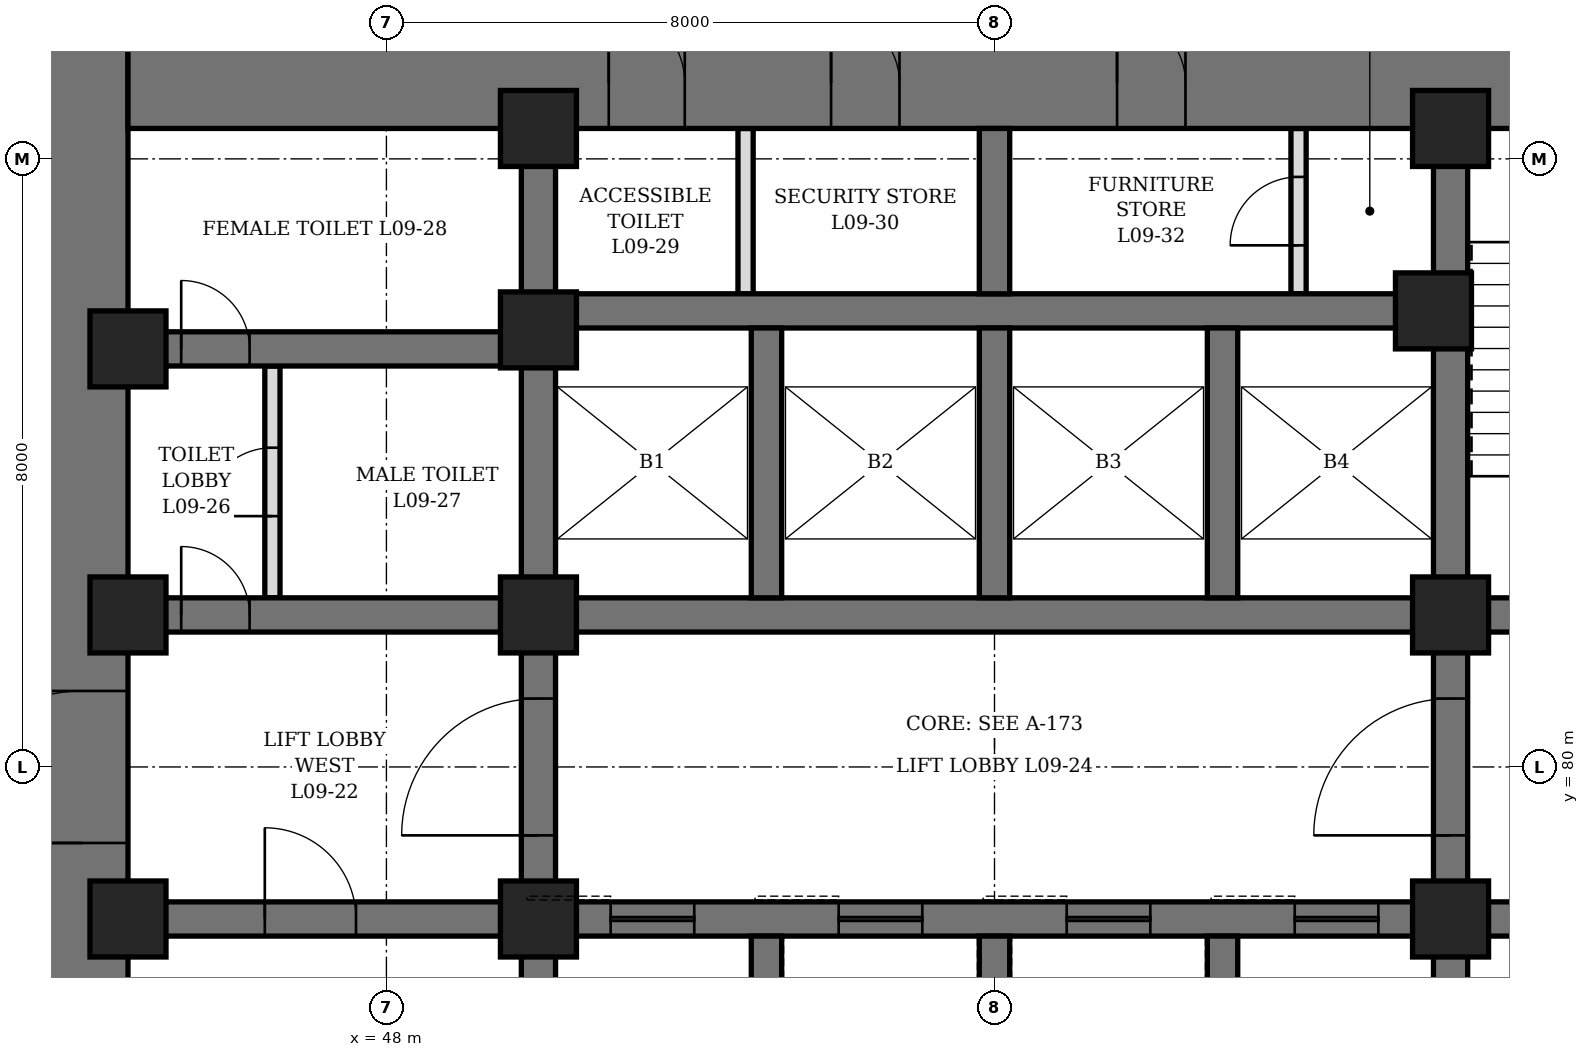
"""IFC4 building model, lengths in metres.
Left out: names, types, materials, properties, quantities, classifications, styles, units other than length and angle.
Written with IfcOpenShell. Run it as: python <this file> out.ifc"""

import sys

from ifc_helpers import new_model, si_unit, direction, frame, frame_2d, origin, origin_2d, place, context, subcontext, project, spatial, rectangle, hollow_rectangle, extrude, element, fill, save


model = new_model("IFC4")
c1 = context("Model", 3, precision=1e-05, world=origin(), true_north=direction((0.0, 1.0)))
c2 = subcontext(c1, "Body", "Model", "MODEL_VIEW")
j1 = project(units=[si_unit("LENGTHUNIT", "METRE"), si_unit("PLANEANGLEUNIT", "RADIAN")], contexts=[c1])
p1 = place(None, origin())
s1 = spatial("IfcSite", under=j1, at=p1, CompositionType="ELEMENT")
p2 = place(p1, origin())
s2 = spatial("IfcBuilding", under=s1, at=p2, CompositionType="ELEMENT")
p3 = place(p2, frame((0.0, 0.0, 47.5)))
s3 = spatial("IfcBuildingStorey", under=s2, at=p3, CompositionType="ELEMENT", Elevation=47.5)
p4 = place(p3, frame((44.0, 70.4, 0.0), z_axis=(0.0, 0.0, 1.0), x_axis=(0.0, 1.0, 0.0)))
e1 = element("IfcWall", 1, at=p4, inside=s3, PredefinedType="SHEAR", context=c2, shape_type="SweptSolid", body=[
    extrude(rectangle(XDim=19.2, YDim=1.2, at=frame_2d((9.6, 0.0))), origin(), (0.0, 0.0, 1.0), 4.2),
])
p5 = place(p4, frame((8.6, 0.0, 0.0)))
e2 = element("IfcOpeningElement", 2, at=p5, cuts=e1, PredefinedType="OPENING", context=c2, shape_type="SweptSolid", body=[
    extrude(rectangle(XDim=2.0, YDim=2.4, at=frame_2d((1.0, 1.2))), frame((0.0, 0.61, 0.0), z_axis=(0.0, -1.0, 0.0), x_axis=(1.0, 0.0, 0.0)), (0.0, 0.0, 1.0), 1.22),
])
p6 = place(p3, frame((44.6, 89.0, 0.0), z_axis=(0.0, 0.0, 1.0), x_axis=(1.0, 0.0, 0.0)))
e3 = element("IfcWall", 3, at=p6, inside=s3, PredefinedType="SHEAR", context=c2, shape_type="SweptSolid", body=[
    extrude(rectangle(XDim=22.8, YDim=1.2, at=frame_2d((11.4, 0.0))), origin(), (0.0, 0.0, 1.0), 4.2),
])
p7 = place(p6, frame((6.325, 0.0, 0.0)))
e4 = element("IfcOpeningElement", 4, at=p7, cuts=e3, PredefinedType="OPENING", context=c2, shape_type="SweptSolid", body=[
    extrude(rectangle(XDim=1.0, YDim=2.1, at=frame_2d((0.5, 1.05))), frame((0.0, 0.61, 0.0), z_axis=(0.0, -1.0, 0.0), x_axis=(1.0, 0.0, 0.0)), (0.0, 0.0, 1.0), 1.22),
])
p8 = place(p6, frame((9.25, 0.0, 0.0)))
e5 = element("IfcOpeningElement", 5, at=p8, cuts=e3, PredefinedType="OPENING", context=c2, shape_type="SweptSolid", body=[
    extrude(rectangle(XDim=0.9, YDim=2.1, at=frame_2d((0.45, 1.05))), frame((0.0, 0.61, 0.0), z_axis=(0.0, -1.0, 0.0), x_axis=(1.0, 0.0, 0.0)), (0.0, 0.0, 1.0), 1.22),
])
p9 = place(p6, frame((13.012, 0.0, 0.0)))
e6 = element("IfcOpeningElement", 6, at=p9, cuts=e3, PredefinedType="OPENING", context=c2, shape_type="SweptSolid", body=[
    extrude(rectangle(XDim=0.9, YDim=2.1, at=frame_2d((0.45, 1.05))), frame((0.0, 0.61, 0.0), z_axis=(0.0, -1.0, 0.0), x_axis=(1.0, 0.0, 0.0)), (0.0, 0.0, 1.0), 1.22),
])
p10 = place(p3, frame((50.0, 71.6, 0.0), z_axis=(0.0, 0.0, 1.0), x_axis=(0.0, 1.0, 0.0)))
e7 = element("IfcWall", 7, at=p10, inside=s3, PredefinedType="SHEAR", context=c2, shape_type="SweptSolid", body=[
    extrude(rectangle(XDim=16.8, YDim=0.45, at=frame_2d((8.4, 0.0))), origin(), (0.0, 0.0, 1.0), 4.2),
])
p11 = place(p10, frame((7.5, 0.0, 0.0)))
e8 = element("IfcOpeningElement", 8, at=p11, cuts=e7, PredefinedType="OPENING", context=c2, shape_type="SweptSolid", body=[
    extrude(rectangle(XDim=1.8, YDim=2.4, at=frame_2d((0.9, 1.2))), frame((0.0, 0.235, 0.0), z_axis=(0.0, -1.0, 0.0), x_axis=(1.0, 0.0, 0.0)), (0.0, 0.0, 1.0), 0.47),
])
p12 = place(p3, frame((62.0, 71.6, 0.0), z_axis=(0.0, 0.0, 1.0), x_axis=(0.0, 1.0, 0.0)))
e9 = element("IfcWall", 9, at=p12, inside=s3, PredefinedType="SHEAR", context=c2, shape_type="SweptSolid", body=[
    extrude(rectangle(XDim=16.8, YDim=0.45, at=frame_2d((8.4, 0.0))), origin(), (0.0, 0.0, 1.0), 4.2),
])
p13 = place(p12, frame((7.5, 0.0, 0.0)))
e10 = element("IfcOpeningElement", 10, at=p13, cuts=e9, PredefinedType="OPENING", context=c2, shape_type="SweptSolid", body=[
    extrude(rectangle(XDim=1.8, YDim=2.4, at=frame_2d((0.9, 1.2))), frame((0.0, 0.235, 0.0), z_axis=(0.0, -1.0, 0.0), x_axis=(1.0, 0.0, 0.0)), (0.0, 0.0, 1.0), 0.47),
])
p14 = place(p3, frame((44.6, 78.0, 0.0), z_axis=(0.0, 0.0, 1.0), x_axis=(1.0, 0.0, 0.0)))
e11 = element("IfcWall", 11, at=p14, inside=s3, PredefinedType="SHEAR", context=c2, shape_type="SweptSolid", body=[
    extrude(rectangle(XDim=5.175, YDim=0.45, at=frame_2d((2.587, 0.0))), origin(), (0.0, 0.0, 1.0), 4.2),
])
p15 = place(p14, frame((1.8, 0.0, 0.0)))
e12 = element("IfcOpeningElement", 12, at=p15, cuts=e11, PredefinedType="OPENING", context=c2, shape_type="SweptSolid", body=[
    extrude(rectangle(XDim=1.2, YDim=2.1, at=frame_2d((0.6, 1.05))), frame((0.0, 0.235, 0.0), z_axis=(0.0, -1.0, 0.0), x_axis=(1.0, 0.0, 0.0)), (0.0, 0.0, 1.0), 0.47),
])
p16 = place(p3, frame((44.6, 82.0, 0.0), z_axis=(0.0, 0.0, 1.0), x_axis=(1.0, 0.0, 0.0)))
e13 = element("IfcWall", 13, at=p16, inside=s3, PredefinedType="SHEAR", context=c2, shape_type="SweptSolid", body=[
    extrude(rectangle(XDim=5.175, YDim=0.45, at=frame_2d((2.587, 0.0))), origin(), (0.0, 0.0, 1.0), 4.2),
])
p17 = place(p16, frame((0.7, 0.0, 0.0)))
e14 = element("IfcOpeningElement", 14, at=p17, cuts=e13, PredefinedType="OPENING", context=c2, shape_type="SweptSolid", body=[
    extrude(rectangle(XDim=0.9, YDim=2.1, at=frame_2d((0.45, 1.05))), frame((0.0, 0.235, 0.0), z_axis=(0.0, -1.0, 0.0), x_axis=(1.0, 0.0, 0.0)), (0.0, 0.0, 1.0), 0.47),
])
p18 = place(p3, frame((44.6, 85.5, 0.0), z_axis=(0.0, 0.0, 1.0), x_axis=(1.0, 0.0, 0.0)))
e15 = element("IfcWall", 15, at=p18, inside=s3, PredefinedType="SHEAR", context=c2, shape_type="SweptSolid", body=[
    extrude(rectangle(XDim=5.175, YDim=0.45, at=frame_2d((2.587, 0.0))), origin(), (0.0, 0.0, 1.0), 4.2),
])
p19 = place(p18, frame((0.7, 0.0, 0.0)))
e16 = element("IfcOpeningElement", 16, at=p19, cuts=e15, PredefinedType="OPENING", context=c2, shape_type="SweptSolid", body=[
    extrude(rectangle(XDim=0.9, YDim=2.1, at=frame_2d((0.45, 1.05))), frame((0.0, 0.235, 0.0), z_axis=(0.0, -1.0, 0.0), x_axis=(1.0, 0.0, 0.0)), (0.0, 0.0, 1.0), 0.47),
])
p20 = place(p3, frame((62.225, 78.0, 0.0), z_axis=(0.0, 0.0, 1.0), x_axis=(1.0, 0.0, 0.0)))
e17 = element("IfcWall", 17, at=p20, inside=s3, PredefinedType="SHEAR", context=c2, shape_type="SweptSolid", body=[
    extrude(rectangle(XDim=5.175, YDim=0.45, at=frame_2d((2.587, 0.0))), origin(), (0.0, 0.0, 1.0), 4.2),
])
p21 = place(p20, frame((2.175, 0.0, 0.0)))
e18 = element("IfcOpeningElement", 18, at=p21, cuts=e17, PredefinedType="OPENING", context=c2, shape_type="SweptSolid", body=[
    extrude(rectangle(XDim=1.2, YDim=2.1, at=frame_2d((0.6, 1.05))), frame((0.0, 0.235, 0.0), z_axis=(0.0, -1.0, 0.0), x_axis=(1.0, 0.0, 0.0)), (0.0, 0.0, 1.0), 0.47),
])
p22 = place(p3, frame((62.225, 82.0, 0.0), z_axis=(0.0, 0.0, 1.0), x_axis=(1.0, 0.0, 0.0)))
e19 = element("IfcWall", 19, at=p22, inside=s3, PredefinedType="SHEAR", context=c2, shape_type="SweptSolid", body=[
    extrude(rectangle(XDim=5.175, YDim=0.45, at=frame_2d((2.587, 0.0))), origin(), (0.0, 0.0, 1.0), 4.2),
])
p23 = place(p22, frame((2.175, 0.0, 0.0)))
e20 = element("IfcOpeningElement", 20, at=p23, cuts=e19, PredefinedType="OPENING", context=c2, shape_type="SweptSolid", body=[
    extrude(rectangle(XDim=1.2, YDim=2.1, at=frame_2d((0.6, 1.05))), frame((0.0, 0.235, 0.0), z_axis=(0.0, -1.0, 0.0), x_axis=(1.0, 0.0, 0.0)), (0.0, 0.0, 1.0), 0.47),
])
p24 = place(p3, frame((50.225, 78.0, 0.0), z_axis=(0.0, 0.0, 1.0), x_axis=(1.0, 0.0, 0.0)))
e21 = element("IfcWall", 21, at=p24, inside=s3, PredefinedType="SHEAR", context=c2, shape_type="SweptSolid", body=[
    extrude(rectangle(XDim=11.55, YDim=0.45, at=frame_2d((5.775, 0.0))), origin(), (0.0, 0.0, 1.0), 4.2),
])
p25 = place(p24, frame((0.725, 0.0, 0.0)))
e22 = element("IfcOpeningElement", 22, at=p25, cuts=e21, PredefinedType="OPENING", context=c2, shape_type="SweptSolid", body=[
    extrude(rectangle(XDim=1.1, YDim=2.2, at=frame_2d((0.55, 1.1))), frame((0.0, 0.235, 0.0), z_axis=(0.0, -1.0, 0.0), x_axis=(1.0, 0.0, 0.0)), (0.0, 0.0, 1.0), 0.47),
])
p26 = place(p24, frame((3.725, 0.0, 0.0)))
e23 = element("IfcOpeningElement", 23, at=p26, cuts=e21, PredefinedType="OPENING", context=c2, shape_type="SweptSolid", body=[
    extrude(rectangle(XDim=1.1, YDim=2.2, at=frame_2d((0.55, 1.1))), frame((0.0, 0.235, 0.0), z_axis=(0.0, -1.0, 0.0), x_axis=(1.0, 0.0, 0.0)), (0.0, 0.0, 1.0), 0.47),
])
p27 = place(p24, frame((6.725, 0.0, 0.0)))
e24 = element("IfcOpeningElement", 24, at=p27, cuts=e21, PredefinedType="OPENING", context=c2, shape_type="SweptSolid", body=[
    extrude(rectangle(XDim=1.1, YDim=2.2, at=frame_2d((0.55, 1.1))), frame((0.0, 0.235, 0.0), z_axis=(0.0, -1.0, 0.0), x_axis=(1.0, 0.0, 0.0)), (0.0, 0.0, 1.0), 0.47),
])
p28 = place(p24, frame((9.725, 0.0, 0.0)))
e25 = element("IfcOpeningElement", 25, at=p28, cuts=e21, PredefinedType="OPENING", context=c2, shape_type="SweptSolid", body=[
    extrude(rectangle(XDim=1.1, YDim=2.2, at=frame_2d((0.55, 1.1))), frame((0.0, 0.235, 0.0), z_axis=(0.0, -1.0, 0.0), x_axis=(1.0, 0.0, 0.0)), (0.0, 0.0, 1.0), 0.47),
])
for number, where, z_axis, x_axis in (
    (26, (50.225, 82.0, 0.0), (0.0, 0.0, 1.0), (1.0, 0.0, 0.0)),
    (27, (50.225, 86.0, 0.0), (0.0, 0.0, 1.0), (1.0, 0.0, 0.0)),
):
    element("IfcWall", number, at=place(p3, frame(where, z_axis=z_axis, x_axis=x_axis)), inside=s3, PredefinedType="SHEAR", context=c2, shape_type="SweptSolid", body=[
        extrude(rectangle(XDim=11.55, YDim=0.45, at=frame_2d((5.775, 0.0))), origin(), (0.0, 0.0, 1.0), 4.2),
    ])
p29 = place(p3, frame((53.0, 74.2, 0.0), z_axis=(0.0, 0.0, 1.0), x_axis=(0.0, 1.0, 0.0)))
e28 = element("IfcWall", 28, at=p29, inside=s3, PredefinedType="SHEAR", context=c2, shape_type="SweptSolid", body=[
    extrude(rectangle(XDim=3.575, YDim=0.4, at=frame_2d((1.788, 0.0))), origin(), (0.0, 0.0, 1.0), 4.2),
])
p30 = place(p3, frame((53.0, 82.225, 0.0), z_axis=(0.0, 0.0, 1.0), x_axis=(0.0, 1.0, 0.0)))
e29 = element("IfcWall", 29, at=p30, inside=s3, PredefinedType="SHEAR", context=c2, shape_type="SweptSolid", body=[
    extrude(rectangle(XDim=3.55, YDim=0.4, at=frame_2d((1.775, 0.0))), origin(), (0.0, 0.0, 1.0), 4.2),
])
p31 = place(p3, frame((56.0, 74.2, 0.0), z_axis=(0.0, 0.0, 1.0), x_axis=(0.0, 1.0, 0.0)))
e30 = element("IfcWall", 30, at=p31, inside=s3, PredefinedType="SHEAR", context=c2, shape_type="SweptSolid", body=[
    extrude(rectangle(XDim=3.575, YDim=0.4, at=frame_2d((1.788, 0.0))), origin(), (0.0, 0.0, 1.0), 4.2),
])
p32 = place(p3, frame((56.0, 82.225, 0.0), z_axis=(0.0, 0.0, 1.0), x_axis=(0.0, 1.0, 0.0)))
e31 = element("IfcWall", 31, at=p32, inside=s3, PredefinedType="SHEAR", context=c2, shape_type="SweptSolid", body=[
    extrude(rectangle(XDim=3.55, YDim=0.4, at=frame_2d((1.775, 0.0))), origin(), (0.0, 0.0, 1.0), 4.2),
])
p33 = place(p3, frame((59.0, 74.2, 0.0), z_axis=(0.0, 0.0, 1.0), x_axis=(0.0, 1.0, 0.0)))
e32 = element("IfcWall", 32, at=p33, inside=s3, PredefinedType="SHEAR", context=c2, shape_type="SweptSolid", body=[
    extrude(rectangle(XDim=3.575, YDim=0.4, at=frame_2d((1.788, 0.0))), origin(), (0.0, 0.0, 1.0), 4.2),
])
p34 = place(p3, frame((59.0, 82.225, 0.0), z_axis=(0.0, 0.0, 1.0), x_axis=(0.0, 1.0, 0.0)))
e33 = element("IfcWall", 33, at=p34, inside=s3, PredefinedType="SHEAR", context=c2, shape_type="SweptSolid", body=[
    extrude(rectangle(XDim=3.55, YDim=0.4, at=frame_2d((1.775, 0.0))), origin(), (0.0, 0.0, 1.0), 4.2),
])
p35 = place(p3, frame((56.0, 86.225, 0.0), z_axis=(0.0, 0.0, 1.0), x_axis=(0.0, 1.0, 0.0)))
e34 = element("IfcWall", 34, at=p35, inside=s3, PredefinedType="SHEAR", context=c2, shape_type="SweptSolid", body=[
    extrude(rectangle(XDim=2.175, YDim=0.4, at=frame_2d((1.087, 0.0))), origin(), (0.0, 0.0, 1.0), 4.2),
])
for number, where, z_axis, x_axis in (
    (35, (44.6, 78.0, 0.0), (0.0, 0.0, 1.0), (1.0, 0.0, 0.0)),
    (36, (44.6, 82.0, 0.0), (0.0, 0.0, 1.0), (1.0, 0.0, 0.0)),
    (37, (44.6, 85.5, 0.0), (0.0, 0.0, 1.0), (1.0, 0.0, 0.0)),
    (38, (50.0, 78.0, 0.0), (0.0, 0.0, 1.0), (1.0, 0.0, 0.0)),
    (39, (50.0, 82.0, 0.0), (0.0, 0.0, 1.0), (1.0, 0.0, 0.0)),
    (40, (50.0, 85.75, 0.0), (0.0, 0.0, 1.0), (1.0, 0.0, 0.0)),
    (41, (50.0, 88.4, 0.0), (0.0, 0.0, 1.0), (1.0, 0.0, 0.0)),
    (42, (61.775, 86.0, 0.0), (0.0, 0.0, 1.0), (1.0, 0.0, 0.0)),
    (43, (62.0, 78.0, 0.0), (0.0, 0.0, 1.0), (1.0, 0.0, 0.0)),
    (44, (62.0, 82.0, 0.0), (0.0, 0.0, 1.0), (1.0, 0.0, 0.0)),
    (45, (62.0, 88.4, 0.0), (0.0, 0.0, 1.0), (1.0, 0.0, 0.0)),
):
    element("IfcColumn", number, at=place(p3, frame(where, z_axis=z_axis, x_axis=x_axis)), inside=s3, PredefinedType="COLUMN", context=c2, shape_type="SweptSolid", body=[
        extrude(hollow_rectangle(XDim=1.0, YDim=1.0, WallThickness=0.15, at=origin_2d()), origin(), (0.0, 0.0, 1.0), 4.2),
    ])
p36 = place(p3, frame((46.5, 82.225, 0.0), z_axis=(0.0, 0.0, 1.0), x_axis=(0.0, 1.0, 0.0)))
e46 = element("IfcWall", 46, at=p36, inside=s3, PredefinedType="PARTITIONING", context=c2, shape_type="SweptSolid", body=[
    extrude(rectangle(XDim=3.05, YDim=0.2, at=frame_2d((1.525, 0.0))), origin(), (0.0, 0.0, 1.0), 4.04),
])
p37 = place(p36, frame((1.075, 0.0, 0.0)))
e47 = element("IfcOpeningElement", 47, at=p37, cuts=e46, PredefinedType="OPENING", context=c2, shape_type="SweptSolid", body=[
    extrude(rectangle(XDim=0.9, YDim=2.1, at=frame_2d((0.45, 1.05))), frame((0.0, 0.11, 0.0), z_axis=(0.0, -1.0, 0.0), x_axis=(1.0, 0.0, 0.0)), (0.0, 0.0, 1.0), 0.22),
])
p38 = place(p3, frame((52.725, 86.225, 0.0), z_axis=(0.0, 0.0, 1.0), x_axis=(0.0, 1.0, 0.0)))
e48 = element("IfcWall", 48, at=p38, inside=s3, PredefinedType="PARTITIONING", context=c2, shape_type="SweptSolid", body=[
    extrude(rectangle(XDim=2.175, YDim=0.2, at=frame_2d((1.087, 0.0))), origin(), (0.0, 0.0, 1.0), 4.04),
])
p39 = place(p3, frame((60.0, 86.225, 0.0), z_axis=(0.0, 0.0, 1.0), x_axis=(0.0, 1.0, 0.0)))
e49 = element("IfcWall", 49, at=p39, inside=s3, PredefinedType="PARTITIONING", context=c2, shape_type="SweptSolid", body=[
    extrude(rectangle(XDim=2.175, YDim=0.2, at=frame_2d((1.087, 0.0))), origin(), (0.0, 0.0, 1.0), 4.04),
])
p40 = place(p39, frame((0.637, 0.0, 0.0)))
e50 = element("IfcOpeningElement", 50, at=p40, cuts=e49, PredefinedType="OPENING", context=c2, shape_type="SweptSolid", body=[
    extrude(rectangle(XDim=0.9, YDim=2.1, at=frame_2d((0.45, 1.05))), frame((0.0, 0.11, 0.0), z_axis=(0.0, -1.0, 0.0), x_axis=(1.0, 0.0, 0.0)), (0.0, 0.0, 1.0), 0.22),
])
p41 = place(p17, origin())
e51 = element("IfcDoor", 51, at=p41, inside=s3, OperationType="SINGLE_SWING_LEFT", PredefinedType="DOOR", context=c2, shape_type="SweptSolid", body=[
    extrude(rectangle(XDim=0.9, YDim=2.1, at=frame_2d((0.45, 1.05))), frame((0.0, 0.225, 0.0), z_axis=(0.0, -1.0, 0.0), x_axis=(1.0, 0.0, 0.0)), (0.0, 0.0, 1.0), 0.449),
])
fill(e14, e51)
p42 = place(p37, origin())
e52 = element("IfcDoor", 52, at=p42, inside=s3, OperationType="SINGLE_SWING_RIGHT", PredefinedType="DOOR", context=c2, shape_type="SweptSolid", body=[
    extrude(rectangle(XDim=0.9, YDim=2.1, at=frame_2d((0.45, 1.05))), frame((0.0, 0.1, 0.0), z_axis=(0.0, -1.0, 0.0), x_axis=(1.0, 0.0, 0.0)), (0.0, 0.0, 1.0), 0.199),
])
fill(e47, e52)
p43 = place(p19, origin())
e53 = element("IfcDoor", 53, at=p43, inside=s3, OperationType="SINGLE_SWING_RIGHT", PredefinedType="DOOR", context=c2, shape_type="SweptSolid", body=[
    extrude(rectangle(XDim=0.9, YDim=2.1, at=frame_2d((0.45, 1.05))), frame((0.0, 0.225, 0.0), z_axis=(0.0, -1.0, 0.0), x_axis=(1.0, 0.0, 0.0)), (0.0, 0.0, 1.0), 0.449),
])
fill(e16, e53)
p44 = place(p7, origin())
e54 = element("IfcDoor", 54, at=p44, inside=s3, OperationType="SINGLE_SWING_LEFT", PredefinedType="DOOR", context=c2, shape_type="SweptSolid", body=[
    extrude(rectangle(XDim=1.0, YDim=2.1, at=frame_2d((0.5, 1.05))), frame((0.0, 0.35, 0.0), z_axis=(0.0, -1.0, 0.0), x_axis=(1.0, 0.0, 0.0)), (0.0, 0.0, 1.0), 0.7),
])
fill(e4, e54)
p45 = place(p8, origin())
e55 = element("IfcDoor", 55, at=p45, inside=s3, OperationType="SINGLE_SWING_LEFT", PredefinedType="DOOR", context=c2, shape_type="SweptSolid", body=[
    extrude(rectangle(XDim=0.9, YDim=2.1, at=frame_2d((0.45, 1.05))), frame((0.0, 0.35, 0.0), z_axis=(0.0, -1.0, 0.0), x_axis=(1.0, 0.0, 0.0)), (0.0, 0.0, 1.0), 0.7),
])
fill(e5, e55)
p46 = place(p9, origin())
e56 = element("IfcDoor", 56, at=p46, inside=s3, OperationType="SINGLE_SWING_LEFT", PredefinedType="DOOR", context=c2, shape_type="SweptSolid", body=[
    extrude(rectangle(XDim=0.9, YDim=2.1, at=frame_2d((0.45, 1.05))), frame((0.0, 0.35, 0.0), z_axis=(0.0, -1.0, 0.0), x_axis=(1.0, 0.0, 0.0)), (0.0, 0.0, 1.0), 0.7),
])
fill(e6, e56)
p47 = place(p40, origin())
e57 = element("IfcDoor", 57, at=p47, inside=s3, OperationType="SINGLE_SWING_LEFT", PredefinedType="DOOR", context=c2, shape_type="SweptSolid", body=[
    extrude(rectangle(XDim=0.9, YDim=2.1, at=frame_2d((0.45, 1.05))), frame((0.0, 0.1, 0.0), z_axis=(0.0, -1.0, 0.0), x_axis=(1.0, 0.0, 0.0)), (0.0, 0.0, 1.0), 0.199),
])
fill(e50, e57)
p48 = place(p15, origin())
e58 = element("IfcDoor", 58, at=p48, inside=s3, OperationType="SINGLE_SWING_LEFT", PredefinedType="DOOR", context=c2, shape_type="SweptSolid", body=[
    extrude(rectangle(XDim=1.2, YDim=2.1, at=frame_2d((0.6, 1.05))), frame((0.0, 0.225, 0.0), z_axis=(0.0, -1.0, 0.0), x_axis=(1.0, 0.0, 0.0)), (0.0, 0.0, 1.0), 0.449),
])
fill(e12, e58)
p49 = place(p5, origin())
e59 = element("IfcDoor", 59, at=p49, inside=s3, OperationType="DOUBLE_DOOR_SINGLE_SWING", PredefinedType="DOOR", context=c2, shape_type="SweptSolid", body=[
    extrude(rectangle(XDim=2.0, YDim=2.4, at=frame_2d((1.0, 1.2))), frame((0.0, 0.35, 0.0), z_axis=(0.0, -1.0, 0.0), x_axis=(1.0, 0.0, 0.0)), (0.0, 0.0, 1.0), 0.7),
])
fill(e2, e59)
p50 = place(p11, origin())
e60 = element("IfcDoor", 60, at=p50, inside=s3, OperationType="DOUBLE_DOOR_SINGLE_SWING", PredefinedType="DOOR", context=c2, shape_type="SweptSolid", body=[
    extrude(rectangle(XDim=1.8, YDim=2.4, at=frame_2d((0.9, 1.2))), frame((0.0, 0.225, 0.0), z_axis=(0.0, -1.0, 0.0), x_axis=(1.0, 0.0, 0.0)), (0.0, 0.0, 1.0), 0.449),
])
fill(e8, e60)
p51 = place(p13, origin())
e61 = element("IfcDoor", 61, at=p51, inside=s3, OperationType="DOUBLE_DOOR_SINGLE_SWING", PredefinedType="DOOR", context=c2, shape_type="SweptSolid", body=[
    extrude(rectangle(XDim=1.8, YDim=2.4, at=frame_2d((0.9, 1.2))), frame((0.0, 0.225, 0.0), z_axis=(0.0, -1.0, 0.0), x_axis=(1.0, 0.0, 0.0)), (0.0, 0.0, 1.0), 0.449),
])
fill(e10, e61)
p52 = place(p25, origin())
e62 = element("IfcDoor", 62, at=p52, inside=s3, OperationType="SLIDING_TO_LEFT", PredefinedType="DOOR", context=c2, shape_type="SweptSolid", body=[
    extrude(rectangle(XDim=1.1, YDim=2.2, at=frame_2d((0.55, 1.1))), frame((0.0, 0.225, 0.0), z_axis=(0.0, -1.0, 0.0), x_axis=(1.0, 0.0, 0.0)), (0.0, 0.0, 1.0), 0.449),
])
fill(e22, e62)
p53 = place(p26, origin())
e63 = element("IfcDoor", 63, at=p53, inside=s3, OperationType="SLIDING_TO_LEFT", PredefinedType="DOOR", context=c2, shape_type="SweptSolid", body=[
    extrude(rectangle(XDim=1.1, YDim=2.2, at=frame_2d((0.55, 1.1))), frame((0.0, 0.225, 0.0), z_axis=(0.0, -1.0, 0.0), x_axis=(1.0, 0.0, 0.0)), (0.0, 0.0, 1.0), 0.449),
])
fill(e23, e63)
p54 = place(p27, origin())
e64 = element("IfcDoor", 64, at=p54, inside=s3, OperationType="SLIDING_TO_LEFT", PredefinedType="DOOR", context=c2, shape_type="SweptSolid", body=[
    extrude(rectangle(XDim=1.1, YDim=2.2, at=frame_2d((0.55, 1.1))), frame((0.0, 0.225, 0.0), z_axis=(0.0, -1.0, 0.0), x_axis=(1.0, 0.0, 0.0)), (0.0, 0.0, 1.0), 0.449),
])
fill(e24, e64)
p55 = place(p28, origin())
e65 = element("IfcDoor", 65, at=p55, inside=s3, OperationType="SLIDING_TO_LEFT", PredefinedType="DOOR", context=c2, shape_type="SweptSolid", body=[
    extrude(rectangle(XDim=1.1, YDim=2.2, at=frame_2d((0.55, 1.1))), frame((0.0, 0.225, 0.0), z_axis=(0.0, -1.0, 0.0), x_axis=(1.0, 0.0, 0.0)), (0.0, 0.0, 1.0), 0.449),
])
fill(e25, e65)
save(model, sys.argv[1])
